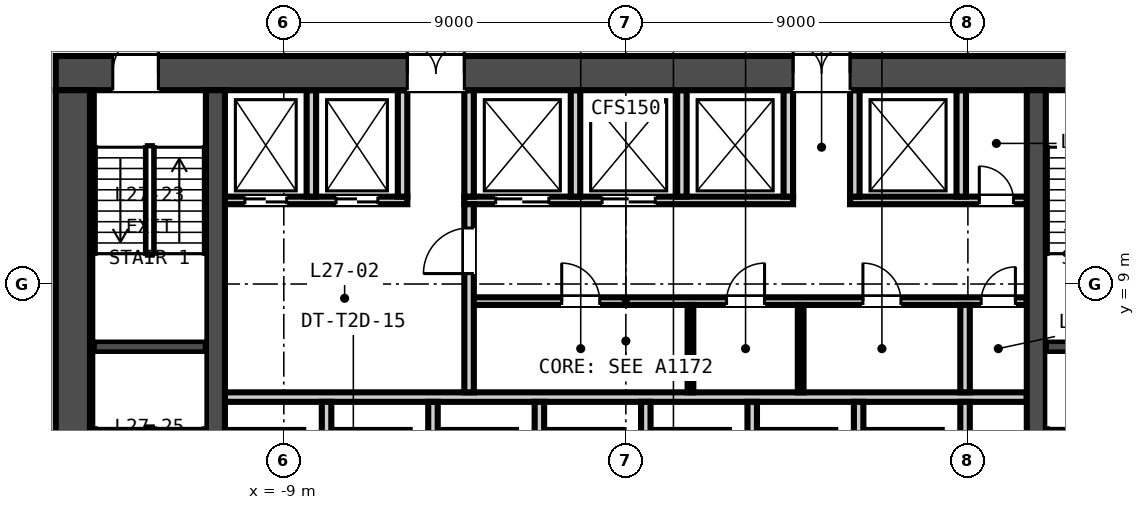
"""IFC4 building model, lengths in metres.
Left out: names, types, materials, properties, quantities, classifications, styles, units other than length and angle.
Written with IfcOpenShell. Run it as: python <this file> out.ifc"""

import sys

from ifc_helpers import new_model, si_unit, direction, frame, frame_2d, origin, place, context, subcontext, project, spatial, rectangle, extrude, element, fill, save


model = new_model("IFC4")
c1 = context("Model", 3, precision=1e-05, world=origin(), true_north=direction((0.0, 1.0)))
c2 = subcontext(c1, "Body", "Model", "MODEL_VIEW")
j1 = project(units=[si_unit("LENGTHUNIT", "METRE"), si_unit("PLANEANGLEUNIT", "RADIAN")], contexts=[c1])
p1 = place(None, origin())
s1 = spatial("IfcSite", under=j1, at=p1, CompositionType="ELEMENT")
p2 = place(p1, origin())
s2 = spatial("IfcBuilding", under=s1, at=p2, CompositionType="ELEMENT")
p3 = place(p2, frame((0.0, 0.0, 113.5)))
s3 = spatial("IfcBuildingStorey", under=s2, at=p3, CompositionType="ELEMENT", Elevation=113.5)
p4 = place(p3, frame((-15.0, 14.55, -0.15), z_axis=(0.0, 0.0, 1.0), x_axis=(1.0, 0.0, 0.0)))
e1 = element("IfcWall", 1, at=p4, inside=s3, PredefinedType="SOLIDWALL", context=c2, shape_type="SweptSolid", body=[
    extrude(rectangle(XDim=30.0, YDim=0.9, at=frame_2d((15.0, 0.0))), origin(), (0.0, 0.0, 1.0), 3.5),
])
p5 = place(p4, frame((9.25, 0.0, 0.15)))
e2 = element("IfcOpeningElement", 2, at=p5, cuts=e1, PredefinedType="OPENING", context=c2, shape_type="SweptSolid", body=[
    extrude(rectangle(XDim=1.5, YDim=2.1, at=frame_2d((0.75, 1.05))), frame((0.0, 0.46, 0.0), z_axis=(0.0, -1.0, 0.0), x_axis=(1.0, 0.0, 0.0)), (0.0, 0.0, 1.0), 0.92),
])
p6 = place(p4, frame((19.4, 0.0, 0.15)))
e3 = element("IfcOpeningElement", 3, at=p6, cuts=e1, PredefinedType="OPENING", context=c2, shape_type="SweptSolid", body=[
    extrude(rectangle(XDim=1.5, YDim=2.1, at=frame_2d((0.75, 1.05))), frame((0.0, 0.46, 0.0), z_axis=(0.0, -1.0, 0.0), x_axis=(1.0, 0.0, 0.0)), (0.0, 0.0, 1.0), 0.92),
])
p7 = place(p4, frame((1.5, 0.0, 0.15)))
e4 = element("IfcOpeningElement", 4, at=p7, cuts=e1, PredefinedType="OPENING", context=c2, shape_type="SweptSolid", body=[
    extrude(rectangle(XDim=1.2, YDim=2.1, at=frame_2d((0.6, 1.05))), frame((0.0, 0.46, 0.0), z_axis=(0.0, -1.0, 0.0), x_axis=(1.0, 0.0, 0.0)), (0.0, 0.0, 1.0), 0.92),
])
p8 = place(p4, frame((27.3, 0.0, 0.15)))
e5 = element("IfcOpeningElement", 5, at=p8, cuts=e1, PredefinedType="OPENING", context=c2, shape_type="SweptSolid", body=[
    extrude(rectangle(XDim=1.2, YDim=2.1, at=frame_2d((0.6, 1.05))), frame((0.0, 0.46, 0.0), z_axis=(0.0, -1.0, 0.0), x_axis=(1.0, 0.0, 0.0)), (0.0, 0.0, 1.0), 0.92),
])
p9 = place(p3, frame((-14.55, 0.9, -0.15), z_axis=(0.0, 0.0, 1.0), x_axis=(0.0, 1.0, 0.0)))
e6 = element("IfcWall", 6, at=p9, inside=s3, PredefinedType="SOLIDWALL", context=c2, shape_type="SweptSolid", body=[
    extrude(rectangle(XDim=13.2, YDim=0.9, at=frame_2d((6.6, 0.0))), origin(), (0.0, 0.0, 1.0), 3.5),
])
for number, where, z_axis, x_axis in (
    (7, (-10.8, 0.9, -0.15), (0.0, 0.0, 1.0), (0.0, 1.0, 0.0)),
    (8, (10.8, 0.9, -0.15), (0.0, 0.0, 1.0), (0.0, 1.0, 0.0)),
):
    element("IfcWall", number, at=place(p3, frame(where, z_axis=z_axis, x_axis=x_axis)), inside=s3, PredefinedType="SOLIDWALL", context=c2, shape_type="SweptSolid", body=[
        extrude(rectangle(XDim=13.2, YDim=0.5, at=frame_2d((6.6, 0.0))), origin(), (0.0, 0.0, 1.0), 3.5),
    ])
p10 = place(p3, frame((-10.55, 6.025, 0.0), z_axis=(0.0, 0.0, 1.0), x_axis=(1.0, 0.0, 0.0)))
e9 = element("IfcWall", 9, at=p10, inside=s3, PredefinedType="PARTITIONING", context=c2, shape_type="SweptSolid", body=[
    extrude(rectangle(XDim=21.1, YDim=0.25, at=frame_2d((10.55, 0.0))), origin(), (0.0, 0.0, 1.0), 3.35),
])
p11 = place(p3, frame((-4.125, 8.55, 0.0), z_axis=(0.0, 0.0, 1.0), x_axis=(1.0, 0.0, 0.0)))
e10 = element("IfcWall", 10, at=p11, inside=s3, PredefinedType="PARTITIONING", context=c2, shape_type="SweptSolid", body=[
    extrude(rectangle(XDim=14.675, YDim=0.2, at=frame_2d((7.337, 0.0))), origin(), (0.0, 0.0, 1.0), 3.35),
])
p12 = place(p11, frame((2.438, 0.0, 0.0)))
e11 = element("IfcOpeningElement", 11, at=p12, cuts=e10, PredefinedType="OPENING", context=c2, shape_type="SweptSolid", body=[
    extrude(rectangle(XDim=1.0, YDim=2.1, at=frame_2d((0.5, 1.05))), frame((0.0, 0.11, 0.0), z_axis=(0.0, -1.0, 0.0), x_axis=(1.0, 0.0, 0.0)), (0.0, 0.0, 1.0), 0.22),
])
p13 = place(p11, frame((6.775, 0.0, 0.0)))
e12 = element("IfcOpeningElement", 12, at=p13, cuts=e10, PredefinedType="OPENING", context=c2, shape_type="SweptSolid", body=[
    extrude(rectangle(XDim=1.0, YDim=2.1, at=frame_2d((0.5, 1.05))), frame((0.0, 0.11, 0.0), z_axis=(0.0, -1.0, 0.0), x_axis=(1.0, 0.0, 0.0)), (0.0, 0.0, 1.0), 0.22),
])
p14 = place(p11, frame((10.363, 0.0, 0.0)))
e13 = element("IfcOpeningElement", 13, at=p14, cuts=e10, PredefinedType="OPENING", context=c2, shape_type="SweptSolid", body=[
    extrude(rectangle(XDim=1.0, YDim=2.1, at=frame_2d((0.5, 1.05))), frame((0.0, 0.11, 0.0), z_axis=(0.0, -1.0, 0.0), x_axis=(1.0, 0.0, 0.0)), (0.0, 0.0, 1.0), 0.22),
])
p15 = place(p11, frame((13.475, 0.0, 0.0)))
e14 = element("IfcOpeningElement", 14, at=p15, cuts=e10, PredefinedType="OPENING", context=c2, shape_type="SweptSolid", body=[
    extrude(rectangle(XDim=0.9, YDim=2.1, at=frame_2d((0.45, 1.05))), frame((0.0, 0.11, 0.0), z_axis=(0.0, -1.0, 0.0), x_axis=(1.0, 0.0, 0.0)), (0.0, 0.0, 1.0), 0.22),
])
p16 = place(p3, frame((-10.55, 11.2, 0.0), z_axis=(0.0, 0.0, 1.0), x_axis=(1.0, 0.0, 0.0)))
e15 = element("IfcWall", 15, at=p16, inside=s3, PredefinedType="PARTITIONING", context=c2, shape_type="SweptSolid", body=[
    extrude(rectangle(XDim=4.8, YDim=0.2, at=frame_2d((2.4, 0.0))), origin(), (0.0, 0.0, 1.0), 3.35),
])
p17 = place(p16, frame((0.525, 0.0, 0.0)))
e16 = element("IfcOpeningElement", 16, at=p17, cuts=e15, PredefinedType="OPENING", context=c2, shape_type="SweptSolid", body=[
    extrude(rectangle(XDim=1.1, YDim=2.1, at=frame_2d((0.55, 1.05))), frame((0.0, 0.11, 0.0), z_axis=(0.0, -1.0, 0.0), x_axis=(1.0, 0.0, 0.0)), (0.0, 0.0, 1.0), 0.22),
])
p18 = place(p16, frame((2.925, 0.0, 0.0)))
e17 = element("IfcOpeningElement", 17, at=p18, cuts=e15, PredefinedType="OPENING", context=c2, shape_type="SweptSolid", body=[
    extrude(rectangle(XDim=1.1, YDim=2.1, at=frame_2d((0.55, 1.05))), frame((0.0, 0.11, 0.0), z_axis=(0.0, -1.0, 0.0), x_axis=(1.0, 0.0, 0.0)), (0.0, 0.0, 1.0), 0.22),
])
p19 = place(p3, frame((-4.25, 11.2, 0.0), z_axis=(0.0, 0.0, 1.0), x_axis=(1.0, 0.0, 0.0)))
e18 = element("IfcWall", 18, at=p19, inside=s3, PredefinedType="PARTITIONING", context=c2, shape_type="SweptSolid", body=[
    extrude(rectangle(XDim=8.65, YDim=0.2, at=frame_2d((4.325, 0.0))), origin(), (0.0, 0.0, 1.0), 3.35),
])
p20 = place(p19, frame((0.825, 0.0, 0.0)))
e19 = element("IfcOpeningElement", 19, at=p20, cuts=e18, PredefinedType="OPENING", context=c2, shape_type="SweptSolid", body=[
    extrude(rectangle(XDim=1.4, YDim=2.1, at=frame_2d((0.7, 1.05))), frame((0.0, 0.11, 0.0), z_axis=(0.0, -1.0, 0.0), x_axis=(1.0, 0.0, 0.0)), (0.0, 0.0, 1.0), 0.22),
])
p21 = place(p19, frame((3.625, 0.0, 0.0)))
e20 = element("IfcOpeningElement", 20, at=p21, cuts=e18, PredefinedType="OPENING", context=c2, shape_type="SweptSolid", body=[
    extrude(rectangle(XDim=1.4, YDim=2.1, at=frame_2d((0.7, 1.05))), frame((0.0, 0.11, 0.0), z_axis=(0.0, -1.0, 0.0), x_axis=(1.0, 0.0, 0.0)), (0.0, 0.0, 1.0), 0.22),
])
p22 = place(p3, frame((5.9, 11.2, 0.0), z_axis=(0.0, 0.0, 1.0), x_axis=(1.0, 0.0, 0.0)))
e21 = element("IfcWall", 21, at=p22, inside=s3, PredefinedType="PARTITIONING", context=c2, shape_type="SweptSolid", body=[
    extrude(rectangle(XDim=4.65, YDim=0.2, at=frame_2d((2.325, 0.0))), origin(), (0.0, 0.0, 1.0), 3.35),
])
p23 = place(p22, frame((3.4, 0.0, 0.0)))
e22 = element("IfcOpeningElement", 22, at=p23, cuts=e21, PredefinedType="OPENING", context=c2, shape_type="SweptSolid", body=[
    extrude(rectangle(XDim=0.9, YDim=2.1, at=frame_2d((0.45, 1.05))), frame((0.0, 0.11, 0.0), z_axis=(0.0, -1.0, 0.0), x_axis=(1.0, 0.0, 0.0)), (0.0, 0.0, 1.0), 0.22),
])
p24 = place(p3, frame((-4.125, 6.15, 0.0), z_axis=(0.0, 0.0, 1.0), x_axis=(0.0, 1.0, 0.0)))
e23 = element("IfcWall", 23, at=p24, inside=s3, PredefinedType="PARTITIONING", context=c2, shape_type="SweptSolid", body=[
    extrude(rectangle(XDim=4.95, YDim=0.25, at=frame_2d((2.475, 0.0))), origin(), (0.0, 0.0, 1.0), 3.35),
])
p25 = place(p24, frame((3.125, 0.0, 0.0)))
e24 = element("IfcOpeningElement", 24, at=p25, cuts=e23, PredefinedType="OPENING", context=c2, shape_type="SweptSolid", body=[
    extrude(rectangle(XDim=1.2, YDim=2.1, at=frame_2d((0.6, 1.05))), frame((0.0, 0.135, 0.0), z_axis=(0.0, -1.0, 0.0), x_axis=(1.0, 0.0, 0.0)), (0.0, 0.0, 1.0), 0.27),
])
for number, where, z_axis, x_axis in (
    (25, (-7.875, 3.6, 0.0), (0.0, 0.0, 1.0), (0.0, 1.0, 0.0)),
    (26, (-5.075, 3.6, 0.0), (0.0, 0.0, 1.0), (0.0, 1.0, 0.0)),
    (27, (-2.275, 3.6, 0.0), (0.0, 0.0, 1.0), (0.0, 1.0, 0.0)),
    (28, (0.525, 3.6, 0.0), (0.0, 0.0, 1.0), (0.0, 1.0, 0.0)),
    (29, (3.325, 3.6, 0.0), (0.0, 0.0, 1.0), (0.0, 1.0, 0.0)),
    (30, (6.125, 3.6, 0.0), (0.0, 0.0, 1.0), (0.0, 1.0, 0.0)),
    (31, (8.925, 3.6, 0.0), (0.0, 0.0, 1.0), (0.0, 1.0, 0.0)),
):
    element("IfcWall", number, at=place(p3, frame(where, z_axis=z_axis, x_axis=x_axis)), inside=s3, PredefinedType="PARTITIONING", context=c2, shape_type="SweptSolid", body=[
        extrude(rectangle(XDim=2.3, YDim=0.25, at=frame_2d((1.15, 0.0))), origin(), (0.0, 0.0, 1.0), 3.35),
    ])
for number, where, z_axis, x_axis in (
    (32, (1.7, 6.15, 0.0), (0.0, 0.0, 1.0), (0.0, 1.0, 0.0)),
    (33, (4.6, 6.15, 0.0), (0.0, 0.0, 1.0), (0.0, 1.0, 0.0)),
):
    element("IfcWall", number, at=place(p3, frame(where, z_axis=z_axis, x_axis=x_axis)), inside=s3, PredefinedType="PARTITIONING", context=c2, shape_type="SweptSolid", body=[
        extrude(rectangle(XDim=2.3, YDim=0.15, at=frame_2d((1.15, 0.0))), origin(), (0.0, 0.0, 1.0), 3.35),
    ])
p26 = place(p3, frame((8.925, 6.15, 0.0), z_axis=(0.0, 0.0, 1.0), x_axis=(0.0, 1.0, 0.0)))
e34 = element("IfcWall", 34, at=p26, inside=s3, PredefinedType="PARTITIONING", context=c2, shape_type="SweptSolid", body=[
    extrude(rectangle(XDim=2.3, YDim=0.25, at=frame_2d((1.15, 0.0))), origin(), (0.0, 0.0, 1.0), 3.35),
])
for number, where, z_axis, x_axis in (
    (35, (-8.275, 11.3, 0.0), (0.0, 0.0, 1.0), (0.0, 1.0, 0.0)),
    (36, (-5.875, 11.3, 0.0), (0.0, 0.0, 1.0), (0.0, 1.0, 0.0)),
    (37, (-4.125, 11.3, 0.0), (0.0, 0.0, 1.0), (0.0, 1.0, 0.0)),
    (38, (-1.325, 11.3, 0.0), (0.0, 0.0, 1.0), (0.0, 1.0, 0.0)),
    (39, (1.475, 11.3, 0.0), (0.0, 0.0, 1.0), (0.0, 1.0, 0.0)),
    (40, (4.275, 11.3, 0.0), (0.0, 0.0, 1.0), (0.0, 1.0, 0.0)),
    (41, (6.025, 11.3, 0.0), (0.0, 0.0, 1.0), (0.0, 1.0, 0.0)),
    (42, (8.825, 11.3, 0.0), (0.0, 0.0, 1.0), (0.0, 1.0, 0.0)),
):
    element("IfcWall", number, at=place(p3, frame(where, z_axis=z_axis, x_axis=x_axis)), inside=s3, PredefinedType="PARTITIONING", context=c2, shape_type="SweptSolid", body=[
        extrude(rectangle(XDim=2.8, YDim=0.25, at=frame_2d((1.4, 0.0))), origin(), (0.0, 0.0, 1.0), 3.35),
    ])
p27 = place(p3, frame((-14.0, 7.35, 0.0), z_axis=(0.0, 0.0, 1.0), x_axis=(1.0, 0.0, 0.0)))
e43 = element("IfcWall", 43, at=p27, inside=s3, PredefinedType="SOLIDWALL", context=c2, shape_type="SweptSolid", body=[
    extrude(rectangle(XDim=2.95, YDim=0.3, at=frame_2d((1.475, 0.0))), origin(), (0.0, 0.0, 1.0), 3.35),
])
p28 = place(p3, frame((-14.05, 0.9, 0.0), z_axis=(0.0, 0.0, 1.0), x_axis=(0.0, 1.0, 0.0)))
e44 = element("IfcWall", 44, at=p28, inside=s3, PredefinedType="SOLIDWALL", context=c2, shape_type="SweptSolid", body=[
    extrude(rectangle(XDim=13.2, YDim=0.1, at=frame_2d((6.6, 0.0))), origin(), (0.0, 0.0, 1.0), 3.35),
])
p29 = place(p3, frame((11.05, 7.35, 0.0), z_axis=(0.0, 0.0, 1.0), x_axis=(1.0, 0.0, 0.0)))
e45 = element("IfcWall", 45, at=p29, inside=s3, PredefinedType="SOLIDWALL", context=c2, shape_type="SweptSolid", body=[
    extrude(rectangle(XDim=2.95, YDim=0.3, at=frame_2d((1.475, 0.0))), origin(), (0.0, 0.0, 1.0), 3.35),
])
p30 = place(p25, origin())
e46 = element("IfcDoor", 46, at=p30, inside=s3, OperationType="SINGLE_SWING_LEFT", PredefinedType="DOOR", context=c2, shape_type="SweptSolid", body=[
    extrude(rectangle(XDim=1.2, YDim=2.1, at=frame_2d((0.6, 1.05))), frame((0.0, 0.025, 0.0), z_axis=(0.0, -1.0, 0.0), x_axis=(1.0, 0.0, 0.0)), (0.0, 0.0, 1.0), 0.05),
])
fill(e24, e46)
p31 = place(p12, origin())
e47 = element("IfcDoor", 47, at=p31, inside=s3, OperationType="SINGLE_SWING_LEFT", PredefinedType="DOOR", context=c2, shape_type="SweptSolid", body=[
    extrude(rectangle(XDim=1.0, YDim=2.1, at=frame_2d((0.5, 1.05))), frame((0.0, 0.025, 0.0), z_axis=(0.0, -1.0, 0.0), x_axis=(1.0, 0.0, 0.0)), (0.0, 0.0, 1.0), 0.05),
])
fill(e11, e47)
p32 = place(p13, origin())
e48 = element("IfcDoor", 48, at=p32, inside=s3, OperationType="SINGLE_SWING_RIGHT", PredefinedType="DOOR", context=c2, shape_type="SweptSolid", body=[
    extrude(rectangle(XDim=1.0, YDim=2.1, at=frame_2d((0.5, 1.05))), frame((0.0, 0.025, 0.0), z_axis=(0.0, -1.0, 0.0), x_axis=(1.0, 0.0, 0.0)), (0.0, 0.0, 1.0), 0.05),
])
fill(e12, e48)
p33 = place(p14, origin())
e49 = element("IfcDoor", 49, at=p33, inside=s3, OperationType="SINGLE_SWING_LEFT", PredefinedType="DOOR", context=c2, shape_type="SweptSolid", body=[
    extrude(rectangle(XDim=1.0, YDim=2.1, at=frame_2d((0.5, 1.05))), frame((0.0, 0.025, 0.0), z_axis=(0.0, -1.0, 0.0), x_axis=(1.0, 0.0, 0.0)), (0.0, 0.0, 1.0), 0.05),
])
fill(e13, e49)
p34 = place(p15, origin())
e50 = element("IfcDoor", 50, at=p34, inside=s3, OperationType="SINGLE_SWING_RIGHT", PredefinedType="DOOR", context=c2, shape_type="SweptSolid", body=[
    extrude(rectangle(XDim=0.9, YDim=2.1, at=frame_2d((0.45, 1.05))), frame((0.0, 0.025, 0.0), z_axis=(0.0, -1.0, 0.0), x_axis=(1.0, 0.0, 0.0)), (0.0, 0.0, 1.0), 0.05),
])
fill(e14, e50)
p35 = place(p17, origin())
e51 = element("IfcDoor", 51, at=p35, inside=s3, OperationType="DOUBLE_DOOR_SLIDING", PredefinedType="DOOR", context=c2, shape_type="SweptSolid", body=[
    extrude(rectangle(XDim=1.1, YDim=2.1, at=frame_2d((0.55, 1.05))), frame((0.0, 0.025, 0.0), z_axis=(0.0, -1.0, 0.0), x_axis=(1.0, 0.0, 0.0)), (0.0, 0.0, 1.0), 0.05),
])
fill(e16, e51)
p36 = place(p18, origin())
e52 = element("IfcDoor", 52, at=p36, inside=s3, OperationType="DOUBLE_DOOR_SLIDING", PredefinedType="DOOR", context=c2, shape_type="SweptSolid", body=[
    extrude(rectangle(XDim=1.1, YDim=2.1, at=frame_2d((0.55, 1.05))), frame((0.0, 0.025, 0.0), z_axis=(0.0, -1.0, 0.0), x_axis=(1.0, 0.0, 0.0)), (0.0, 0.0, 1.0), 0.05),
])
fill(e17, e52)
p37 = place(p20, origin())
e53 = element("IfcDoor", 53, at=p37, inside=s3, OperationType="DOUBLE_DOOR_SLIDING", PredefinedType="DOOR", context=c2, shape_type="SweptSolid", body=[
    extrude(rectangle(XDim=1.4, YDim=2.1, at=frame_2d((0.7, 1.05))), frame((0.0, 0.025, 0.0), z_axis=(0.0, -1.0, 0.0), x_axis=(1.0, 0.0, 0.0)), (0.0, 0.0, 1.0), 0.05),
])
fill(e19, e53)
p38 = place(p21, origin())
e54 = element("IfcDoor", 54, at=p38, inside=s3, OperationType="DOUBLE_DOOR_SLIDING", PredefinedType="DOOR", context=c2, shape_type="SweptSolid", body=[
    extrude(rectangle(XDim=1.4, YDim=2.1, at=frame_2d((0.7, 1.05))), frame((0.0, 0.025, 0.0), z_axis=(0.0, -1.0, 0.0), x_axis=(1.0, 0.0, 0.0)), (0.0, 0.0, 1.0), 0.05),
])
fill(e20, e54)
p39 = place(p23, origin())
e55 = element("IfcDoor", 55, at=p39, inside=s3, OperationType="SINGLE_SWING_LEFT", PredefinedType="DOOR", context=c2, shape_type="SweptSolid", body=[
    extrude(rectangle(XDim=0.9, YDim=2.1, at=frame_2d((0.45, 1.05))), frame((0.0, 0.025, 0.0), z_axis=(0.0, -1.0, 0.0), x_axis=(1.0, 0.0, 0.0)), (0.0, 0.0, 1.0), 0.05),
])
fill(e22, e55)
p40 = place(p5, origin())
e56 = element("IfcDoor", 56, at=p40, inside=s3, OperationType="DOUBLE_DOOR_SINGLE_SWING", PredefinedType="DOOR", context=c2, shape_type="SweptSolid", body=[
    extrude(rectangle(XDim=1.5, YDim=2.1, at=frame_2d((0.75, 1.05))), frame((0.0, 0.025, 0.0), z_axis=(0.0, -1.0, 0.0), x_axis=(1.0, 0.0, 0.0)), (0.0, 0.0, 1.0), 0.05),
])
fill(e2, e56)
p41 = place(p6, origin())
e57 = element("IfcDoor", 57, at=p41, inside=s3, OperationType="DOUBLE_DOOR_SINGLE_SWING", PredefinedType="DOOR", context=c2, shape_type="SweptSolid", body=[
    extrude(rectangle(XDim=1.5, YDim=2.1, at=frame_2d((0.75, 1.05))), frame((0.0, 0.025, 0.0), z_axis=(0.0, -1.0, 0.0), x_axis=(1.0, 0.0, 0.0)), (0.0, 0.0, 1.0), 0.05),
])
fill(e3, e57)
p42 = place(p7, origin())
e58 = element("IfcDoor", 58, at=p42, inside=s3, OperationType="SINGLE_SWING_RIGHT", PredefinedType="DOOR", context=c2, shape_type="SweptSolid", body=[
    extrude(rectangle(XDim=1.2, YDim=2.1, at=frame_2d((0.6, 1.05))), frame((0.0, 0.025, 0.0), z_axis=(0.0, -1.0, 0.0), x_axis=(1.0, 0.0, 0.0)), (0.0, 0.0, 1.0), 0.05),
])
fill(e4, e58)
save(model, sys.argv[1])
